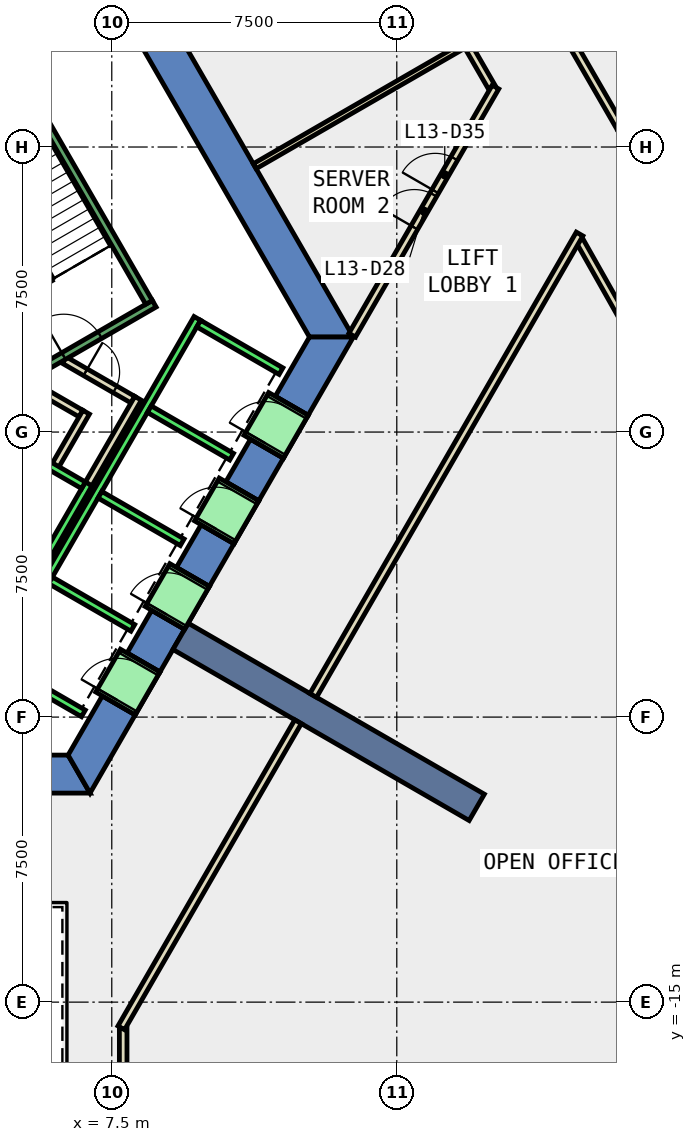
"""IFC4 building model, lengths in metres.
Left out: names, types, materials, properties, quantities, classifications, styles, units other than length and angle.
Written with IfcOpenShell. Run it as: python <this file> out.ifc"""

import sys

from ifc_helpers import new_model, si_unit, direction, frame, frame_2d, origin, place, context, subcontext, project, spatial, polyline, rectangle, outline, extrude, element, fill, save


model = new_model("IFC4")
c1 = context("Model", 3, precision=1e-05, world=origin(), true_north=direction((0.0, 1.0)))
c2 = subcontext(c1, "Body", "Model", "MODEL_VIEW")
j1 = project(units=[si_unit("LENGTHUNIT", "METRE"), si_unit("PLANEANGLEUNIT", "RADIAN")], contexts=[c1])
p1 = place(None, origin())
s1 = spatial("IfcSite", under=j1, at=p1, CompositionType="ELEMENT")
p2 = place(p1, origin())
s2 = spatial("IfcBuilding", under=s1, at=p2, CompositionType="ELEMENT")
p3 = place(p2, frame((0.0, 0.0, 64.4)))
s3 = spatial("IfcBuildingStorey", under=s2, at=p3, CompositionType="ELEMENT", Elevation=64.4)
p4 = place(p3, frame((0.0, 0.0, -0.4)))
e1 = element("IfcWall", 1, at=p4, inside=s3, PredefinedType="SHEAR", context=c2, shape_type="SweptSolid", body=[
    extrude(outline(polyline([(8.517, 11.748), (7.651, 11.248), (12.702, 2.5), (13.856, 2.5), (8.517, 11.748)])), origin(), (0.0, 0.0, 1.0), 4.2),
])
p5 = place(p3, frame((0.0, 0.0, -0.4)))
e2 = element("IfcWall", 2, at=p5, inside=s3, PredefinedType="SHEAR", context=c2, shape_type="SweptSolid", body=[
    extrude(outline(polyline([(5.75, -8.5), (5.75, -9.5), (6.928, -9.5), (6.351, -8.5), (5.75, -8.5)])), origin(), (0.0, 0.0, 1.0), 4.2),
])
p6 = place(p3, frame((0.0, 0.0, -0.4)))
e3 = element("IfcWall", 3, at=p6, inside=s3, PredefinedType="SHEAR", context=c2, shape_type="SweptSolid", body=[
    extrude(outline(polyline([(8.117, -7.44), (7.252, -6.94), (6.351, -8.5), (6.928, -9.5), (8.117, -7.44)])), origin(), (0.0, 0.0, 1.0), 4.2),
])
p7 = place(p3, frame((0.0, 0.0, -0.4)))
e4 = element("IfcWall", 4, at=p7, inside=s3, PredefinedType="SHEAR", context=c2, shape_type="SweptSolid", body=[
    extrude(outline(polyline([(9.417, -5.189), (8.551, -4.689), (7.902, -5.814), (8.767, -6.314), (9.417, -5.189)])), origin(), (0.0, 0.0, 1.0), 4.2),
])
p8 = place(p3, frame((0.0, 0.0, -0.4)))
e5 = element("IfcWall", 5, at=p8, inside=s3, PredefinedType="SHEAR", context=c2, shape_type="SweptSolid", body=[
    extrude(outline(polyline([(10.717, -2.937), (9.851, -2.437), (9.201, -3.563), (10.067, -4.063), (10.717, -2.937)])), origin(), (0.0, 0.0, 1.0), 4.2),
])
p9 = place(p3, frame((0.0, 0.0, -0.4)))
e6 = element("IfcWall", 6, at=p9, inside=s3, PredefinedType="SHEAR", context=c2, shape_type="SweptSolid", body=[
    extrude(outline(polyline([(12.017, -0.686), (11.151, -0.186), (10.501, -1.311), (11.367, -1.811), (12.017, -0.686)])), origin(), (0.0, 0.0, 1.0), 4.2),
])
p10 = place(p3, frame((0.0, 0.0, -0.4)))
e7 = element("IfcWall", 7, at=p10, inside=s3, PredefinedType="SHEAR", context=c2, shape_type="SweptSolid", body=[
    extrude(outline(polyline([(11.801, 0.94), (12.667, 0.44), (13.856, 2.5), (12.702, 2.5), (11.801, 0.94)])), origin(), (0.0, 0.0, 1.0), 4.2),
])
p11 = place(p3, frame((0.0, 0.0, 3.6)))
e8 = element("IfcWall", 8, at=p11, inside=s3, PredefinedType="SHEAR", context=c2, shape_type="SweptSolid", body=[
    extrude(outline(polyline([(8.767, -6.314), (7.902, -5.814), (7.252, -6.94), (8.117, -7.44), (8.767, -6.314)])), origin(), (0.0, 0.0, 1.0), 0.2),
])
p12 = place(p3, frame((0.0, 0.0, 3.6)))
e9 = element("IfcWall", 9, at=p12, inside=s3, PredefinedType="SHEAR", context=c2, shape_type="SweptSolid", body=[
    extrude(outline(polyline([(10.067, -4.063), (9.201, -3.563), (8.551, -4.689), (9.417, -5.189), (10.067, -4.063)])), origin(), (0.0, 0.0, 1.0), 0.2),
])
p13 = place(p3, frame((0.0, 0.0, 3.6)))
e10 = element("IfcWall", 10, at=p13, inside=s3, PredefinedType="SHEAR", context=c2, shape_type="SweptSolid", body=[
    extrude(outline(polyline([(11.367, -1.811), (10.501, -1.311), (9.851, -2.437), (10.717, -2.937), (11.367, -1.811)])), origin(), (0.0, 0.0, 1.0), 0.2),
])
p14 = place(p3, frame((0.0, 0.0, 3.6)))
e11 = element("IfcWall", 11, at=p14, inside=s3, PredefinedType="SHEAR", context=c2, shape_type="SweptSolid", body=[
    extrude(outline(polyline([(12.667, 0.44), (11.801, 0.94), (11.151, -0.186), (12.017, -0.686), (12.667, 0.44)])), origin(), (0.0, 0.0, 1.0), 0.2),
])
p15 = place(p3, frame((9.31, -5.375, -0.4), z_axis=(0.0, 0.0, 1.0), x_axis=(0.866017533419, -0.500013631625, 0.0)))
e12 = element("IfcWall", 12, at=p15, inside=s3, PredefinedType="SHEAR", context=c2, shape_type="SweptSolid", body=[
    extrude(rectangle(XDim=9.0, YDim=0.8, at=frame_2d((4.5, 0.0))), origin(), (0.0, 0.0, 1.0), 4.2),
])
p16 = place(p3, frame((17.497, 9.078, 0.0), z_axis=(0.0, 0.0, 1.0), x_axis=(-0.500126451326, 0.865952384768, 0.0)))
e13 = element("IfcWall", 13, at=p16, inside=s3, PredefinedType="PARTITIONING", context=c2, shape_type="SweptSolid", body=[
    extrude(rectangle(XDim=1.238, YDim=0.2, at=frame_2d((0.619, 0.0))), origin(), (0.0, 0.0, 1.0), 3.8),
])
p17 = place(p3, frame((22.42, 0.415, 0.0), z_axis=(0.0, 0.0, 1.0), x_axis=(-0.491823859571, 0.870694717543, 0.0)))
e14 = element("IfcWall", 14, at=p17, inside=s3, PredefinedType="PARTITIONING", context=c2, shape_type="SweptSolid", body=[
    extrude(rectangle(XDim=5.309, YDim=0.2, at=frame_2d((2.654, 0.0))), origin(), (0.0, 0.0, 1.0), 3.8),
])
p18 = place(p3, frame((17.318, 14.187, 0.0), z_axis=(0.0, 0.0, 1.0), x_axis=(0.499986381413, -0.866033266336, 0.0)))
e15 = element("IfcWall", 15, at=p18, inside=s3, PredefinedType="PARTITIONING", context=c2, shape_type="SweptSolid", body=[
    extrude(rectangle(XDim=7.18, YDim=0.2, at=frame_2d((3.59, 0.0))), origin(), (0.0, 0.0, 1.0), 3.8),
])
p19 = place(p18, frame((3.165, 0.0, 0.0)))
e16 = element("IfcOpeningElement", 16, at=p19, cuts=e15, PredefinedType="OPENING", context=c2, shape_type="SweptSolid", body=[
    extrude(rectangle(XDim=1.0, YDim=2.1, at=frame_2d((0.5, 1.05))), frame((0.0, 0.11, 0.0), z_axis=(0.0, -1.0, 0.0), x_axis=(1.0, 0.0, 0.0)), (0.0, 0.0, 1.0), 0.22),
])
p20 = place(p3, frame((5.499, 1.172, 0.0), z_axis=(0.0, 0.0, 1.0), x_axis=(0.866333505267, -0.499465972466, 0.0)))
e17 = element("IfcWall", 17, at=p20, inside=s3, PredefinedType="PARTITIONING", context=c2, shape_type="SweptSolid", body=[
    extrude(rectangle(XDim=1.374, YDim=0.2, at=frame_2d((0.687, 0.0))), origin(), (0.0, 0.0, 1.0), 3.8),
])
p21 = place(p3, frame((6.826, 0.522, 0.0), z_axis=(0.0, 0.0, 1.0), x_axis=(-0.500016722714, -0.866015748706, 0.0)))
e18 = element("IfcWall", 18, at=p21, inside=s3, PredefinedType="PARTITIONING", context=c2, shape_type="SweptSolid", body=[
    extrude(rectangle(XDim=1.7, YDim=0.2, at=frame_2d((0.85, 0.0))), origin(), (0.0, 0.0, 1.0), 3.8),
])
p22 = place(p3, frame((6.25, 1.894, 0.0), z_axis=(0.0, 0.0, 1.0), x_axis=(0.866043184279, -0.499969202016, 0.0)))
e19 = element("IfcWall", 19, at=p22, inside=s3, PredefinedType="PARTITIONING", context=c2, shape_type="SweptSolid", body=[
    extrude(rectangle(XDim=2.084, YDim=0.2, at=frame_2d((1.042, 0.0))), origin(), (0.0, 0.0, 1.0), 3.8),
])
p23 = place(p22, frame((0.642, 0.0, 0.0)))
e20 = element("IfcOpeningElement", 20, at=p23, cuts=e19, PredefinedType="OPENING", context=c2, shape_type="SweptSolid", body=[
    extrude(rectangle(XDim=0.9, YDim=2.1, at=frame_2d((0.45, 1.05))), frame((0.0, 0.11, 0.0), z_axis=(0.0, -1.0, 0.0), x_axis=(1.0, 0.0, 0.0)), (0.0, 0.0, 1.0), 0.22),
])
p24 = place(p3, frame((8.192, 0.888, 0.0), z_axis=(0.0, 0.0, 1.0), x_axis=(-0.499940625693, -0.866059680843, 0.0)))
e21 = element("IfcWall", 21, at=p24, inside=s3, PredefinedType="PARTITIONING", context=c2, shape_type="SweptSolid", body=[
    extrude(rectangle(XDim=2.68, YDim=0.2, at=frame_2d((1.34, 0.0))), origin(), (0.0, 0.0, 1.0), 3.8),
])
p25 = place(p3, frame((11.261, 6.994, 0.0), z_axis=(0.0, 0.0, 1.0), x_axis=(0.866043905515, 0.499967952693, 0.0)))
e22 = element("IfcWall", 22, at=p25, inside=s3, PredefinedType="PARTITIONING", context=c2, shape_type="SweptSolid", body=[
    extrude(rectangle(XDim=6.542, YDim=0.15, at=frame_2d((3.271, 0.0))), origin(), (0.0, 0.0, 1.0), 3.8),
])
p26 = place(p3, frame((13.827, 2.55, 0.0), z_axis=(0.0, 0.0, 1.0), x_axis=(0.500116794417, 0.865957961995, 0.0)))
e23 = element("IfcWall", 23, at=p26, inside=s3, PredefinedType="PARTITIONING", context=c2, shape_type="SweptSolid", body=[
    extrude(rectangle(XDim=7.538, YDim=0.2, at=frame_2d((3.769, 0.0))), origin(), (0.0, 0.0, 1.0), 3.8),
])
p27 = place(p26, frame((3.269, 0.0, 0.0)))
e24 = element("IfcOpeningElement", 24, at=p27, cuts=e23, PredefinedType="OPENING", context=c2, shape_type="SweptSolid", body=[
    extrude(rectangle(XDim=1.0, YDim=2.1, at=frame_2d((0.5, 1.05))), frame((0.0, 0.11, 0.0), z_axis=(0.0, -1.0, 0.0), x_axis=(1.0, 0.0, 0.0)), (0.0, 0.0, 1.0), 0.22),
])
p28 = place(p26, frame((4.369, 0.0, 0.0)))
e25 = element("IfcOpeningElement", 25, at=p28, cuts=e23, PredefinedType="OPENING", context=c2, shape_type="SweptSolid", body=[
    extrude(rectangle(XDim=1.0, YDim=2.1, at=frame_2d((0.5, 1.05))), frame((0.0, 0.11, 0.0), z_axis=(0.0, -1.0, 0.0), x_axis=(1.0, 0.0, 0.0)), (0.0, 0.0, 1.0), 0.22),
])
p29 = place(p3, frame((7.8, -15.69, 0.0), z_axis=(0.0, 0.0, 1.0), x_axis=(0.0, -1.0, 0.0)))
e26 = element("IfcWall", 26, at=p29, inside=s3, PredefinedType="PARTITIONING", context=c2, shape_type="SweptSolid", body=[
    extrude(rectangle(XDim=3.87, YDim=0.2, at=frame_2d((1.935, 0.0))), origin(), (0.0, 0.0, 1.0), 3.8),
])
p30 = place(p3, frame((19.81, 5.211, 0.0), z_axis=(0.0, 0.0, 1.0), x_axis=(-0.500003368273, -0.866023459102, 0.0)))
e27 = element("IfcWall", 27, at=p30, inside=s3, PredefinedType="PARTITIONING", context=c2, shape_type="SweptSolid", body=[
    extrude(rectangle(XDim=14.018, YDim=0.2, at=frame_2d((7.009, 0.0))), origin(), (0.0, 0.0, 1.0), 3.8),
])
p31 = place(p3, frame((12.401, -7.622, 0.0), z_axis=(0.0, 0.0, 1.0), x_axis=(-0.500029185841, -0.866008552675, 0.0)))
e28 = element("IfcWall", 28, at=p31, inside=s3, PredefinedType="PARTITIONING", context=c2, shape_type="SweptSolid", body=[
    extrude(rectangle(XDim=9.301, YDim=0.2, at=frame_2d((4.651, 0.0))), origin(), (0.0, 0.0, 1.0), 3.8),
])
p32 = place(p3, frame((5.492, -3.788, 0.0), z_axis=(0.0, 0.0, 1.0), x_axis=(0.500011755427, 0.866018616679, 0.0)))
e29 = element("IfcWall", 29, at=p32, inside=s3, PredefinedType="STANDARD", context=c2, shape_type="SweptSolid", body=[
    extrude(rectangle(XDim=2.8, YDim=0.2, at=frame_2d((1.4, 0.0))), origin(), (0.0, 0.0, 1.0), 3.8),
])
p33 = place(p3, frame((4.677, -0.2, 0.0), z_axis=(0.0, 0.0, 1.0), x_axis=(0.865973769406, -0.500089422704, 0.0)))
e30 = element("IfcWall", 30, at=p33, inside=s3, PredefinedType="STANDARD", context=c2, shape_type="SweptSolid", body=[
    extrude(rectangle(XDim=2.399, YDim=0.2, at=frame_2d((1.2, 0.0))), origin(), (0.0, 0.0, 1.0), 3.8),
])
p34 = place(p3, frame((4.451, -6.19, 0.0), z_axis=(0.0, 0.0, 1.0), x_axis=(0.50000090737, 0.866024879913, 0.0)))
e31 = element("IfcWall", 31, at=p34, inside=s3, PredefinedType="STANDARD", context=c2, shape_type="SweptSolid", body=[
    extrude(rectangle(XDim=10.6, YDim=0.2, at=frame_2d((5.3, 0.0))), origin(), (0.0, 0.0, 1.0), 3.8),
])
for number, where, z_axis, x_axis in (
    (32, (4.588, -6.153, 0.0), (0.0, 0.0, 1.0), (0.866, -0.5, 0.0)),
    (33, (5.888, -3.902, 0.0), (0.0, 0.0, 1.0), (0.866, -0.5, 0.0)),
    (34, (7.188, -1.65, 0.0), (0.0, 0.0, 1.0), (0.866, -0.5, 0.0)),
    (35, (8.488, 0.602, 0.0), (0.0, 0.0, 1.0), (0.866, -0.5, 0.0)),
):
    element("IfcWall", number, at=place(p3, frame(where, z_axis=z_axis, x_axis=x_axis)), inside=s3, PredefinedType="STANDARD", context=c2, shape_type="SweptSolid", body=[
        extrude(rectangle(XDim=2.5, YDim=0.2, at=frame_2d((1.25, 0.0))), origin(), (0.0, 0.0, 1.0), 3.8),
    ])
p35 = place(p3, frame((9.788, 2.853, 0.0), z_axis=(0.0, 0.0, 1.0), x_axis=(0.865998541277, -0.500046524342, 0.0)))
e36 = element("IfcWall", 36, at=p35, inside=s3, PredefinedType="STANDARD", context=c2, shape_type="SweptSolid", body=[
    extrude(rectangle(XDim=2.5, YDim=0.2, at=frame_2d((1.25, 0.0))), origin(), (0.0, 0.0, 1.0), 3.8),
])
p36 = place(p3, frame((7.598, -7.14, 0.0), z_axis=(0.0, 0.0, 1.0), x_axis=(0.500362116554, 0.865816234728, 0.0)))
e37 = element("IfcWall", 37, at=p36, inside=s3, PredefinedType="STANDARD", context=c2, shape_type="SweptSolid", body=[
    extrude(rectangle(XDim=1.299, YDim=1.2, at=frame_2d((0.65, 0.0))), origin(), (0.0, 0.0, 1.0), 2.4),
])
p37 = place(p36, frame((0.1, 0.0, 0.0)))
e38 = element("IfcOpeningElement", 38, at=p37, cuts=e37, PredefinedType="OPENING", context=c2, shape_type="SweptSolid", body=[
    extrude(rectangle(XDim=1.1, YDim=2.3, at=frame_2d((0.55, 1.15))), frame((0.0, 0.61, 0.0), z_axis=(0.0, -1.0, 0.0), x_axis=(1.0, 0.0, 0.0)), (0.0, 0.0, 1.0), 1.22),
])
p38 = place(p3, frame((8.898, -4.889, 0.0), z_axis=(0.0, 0.0, 1.0), x_axis=(0.500036693733, 0.866004217611, 0.0)))
e39 = element("IfcWall", 39, at=p38, inside=s3, PredefinedType="STANDARD", context=c2, shape_type="SweptSolid", body=[
    extrude(rectangle(XDim=1.3, YDim=1.2, at=frame_2d((0.65, 0.0))), origin(), (0.0, 0.0, 1.0), 2.4),
])
p39 = place(p38, frame((0.1, 0.0, 0.0)))
e40 = element("IfcOpeningElement", 40, at=p39, cuts=e39, PredefinedType="OPENING", context=c2, shape_type="SweptSolid", body=[
    extrude(rectangle(XDim=1.1, YDim=2.3, at=frame_2d((0.55, 1.15))), frame((0.0, 0.61, 0.0), z_axis=(0.0, -1.0, 0.0), x_axis=(1.0, 0.0, 0.0)), (0.0, 0.0, 1.0), 1.22),
])
p40 = place(p3, frame((10.198, -2.637, 0.0), z_axis=(0.0, 0.0, 1.0), x_axis=(0.49989585183, 0.866085525409, 0.0)))
e41 = element("IfcWall", 41, at=p40, inside=s3, PredefinedType="STANDARD", context=c2, shape_type="SweptSolid", body=[
    extrude(rectangle(XDim=1.3, YDim=1.2, at=frame_2d((0.65, 0.0))), origin(), (0.0, 0.0, 1.0), 2.4),
])
p41 = place(p40, frame((0.1, 0.0, 0.0)))
e42 = element("IfcOpeningElement", 42, at=p41, cuts=e41, PredefinedType="OPENING", context=c2, shape_type="SweptSolid", body=[
    extrude(rectangle(XDim=1.1, YDim=2.3, at=frame_2d((0.55, 1.15))), frame((0.0, 0.61, 0.0), z_axis=(0.0, -1.0, 0.0), x_axis=(1.0, 0.0, 0.0)), (0.0, 0.0, 1.0), 1.22),
])
p42 = place(p3, frame((11.498, -0.385, 0.0), z_axis=(0.0, 0.0, 1.0), x_axis=(0.500221244143, 0.865897630733, 0.0)))
e43 = element("IfcWall", 43, at=p42, inside=s3, PredefinedType="STANDARD", context=c2, shape_type="SweptSolid", body=[
    extrude(rectangle(XDim=1.299, YDim=1.2, at=frame_2d((0.65, 0.0))), origin(), (0.0, 0.0, 1.0), 2.4),
])
p43 = place(p42, frame((0.1, 0.0, 0.0)))
e44 = element("IfcOpeningElement", 44, at=p43, cuts=e43, PredefinedType="OPENING", context=c2, shape_type="SweptSolid", body=[
    extrude(rectangle(XDim=1.1, YDim=2.3, at=frame_2d((0.55, 1.15))), frame((0.0, 0.61, 0.0), z_axis=(0.0, -1.0, 0.0), x_axis=(1.0, 0.0, 0.0)), (0.0, 0.0, 1.0), 1.22),
])
p44 = place(p3, frame((4.806, 1.176, 0.0), z_axis=(0.0, 0.0, 1.0), x_axis=(0.866059941101, 0.499940174841, 0.0)))
e45 = element("IfcWall", 45, at=p44, inside=s3, PredefinedType="STANDARD", context=c2, shape_type="SweptSolid", body=[
    extrude(rectangle(XDim=4.4, YDim=0.2, at=frame_2d((2.2, 0.0))), origin(), (0.0, 0.0, 1.0), 3.8),
])
p45 = place(p44, frame((1.65, 0.0, 0.0)))
e46 = element("IfcOpeningElement", 46, at=p45, cuts=e45, PredefinedType="OPENING", context=c2, shape_type="SweptSolid", body=[
    extrude(rectangle(XDim=1.1, YDim=2.2, at=frame_2d((0.55, 1.1))), frame((0.0, 0.11, 0.0), z_axis=(0.0, -1.0, 0.0), x_axis=(1.0, 0.0, 0.0)), (0.0, 0.0, 1.0), 0.22),
])
p46 = place(p3, frame((8.48, 3.412, 0.0), z_axis=(0.0, 0.0, 1.0), x_axis=(-0.499978703459, 0.866037698999, 0.0)))
e47 = element("IfcWall", 47, at=p46, inside=s3, PredefinedType="STANDARD", context=c2, shape_type="SweptSolid", body=[
    extrude(rectangle(XDim=6.9, YDim=0.2, at=frame_2d((3.45, 0.0))), origin(), (0.0, 0.0, 1.0), 3.8),
])
p47 = place(p27, origin())
e48 = element("IfcDoor", 48, at=p47, inside=s3, OperationType="SINGLE_SWING_LEFT", PredefinedType="DOOR", context=c2, shape_type="SweptSolid", body=[
    extrude(rectangle(XDim=1.0, YDim=2.1, at=frame_2d((0.5, 1.05))), frame((0.0, 0.025, 0.0), z_axis=(0.0, -1.0, 0.0), x_axis=(1.0, 0.0, 0.0)), (0.0, 0.0, 1.0), 0.05),
])
fill(e24, e48)
p48 = place(p23, origin())
e49 = element("IfcDoor", 49, at=p48, inside=s3, OperationType="SINGLE_SWING_LEFT", PredefinedType="DOOR", context=c2, shape_type="SweptSolid", body=[
    extrude(rectangle(XDim=0.9, YDim=2.1, at=frame_2d((0.45, 1.05))), frame((0.0, 0.025, 0.0), z_axis=(0.0, -1.0, 0.0), x_axis=(1.0, 0.0, 0.0)), (0.0, 0.0, 1.0), 0.05),
])
fill(e20, e49)
p49 = place(p28, origin())
e50 = element("IfcDoor", 50, at=p49, inside=s3, OperationType="SINGLE_SWING_RIGHT", PredefinedType="DOOR", context=c2, shape_type="SweptSolid", body=[
    extrude(rectangle(XDim=1.0, YDim=2.1, at=frame_2d((0.5, 1.05))), frame((0.0, 0.025, 0.0), z_axis=(0.0, -1.0, 0.0), x_axis=(1.0, 0.0, 0.0)), (0.0, 0.0, 1.0), 0.05),
])
fill(e25, e50)
p50 = place(p37, origin())
e51 = element("IfcDoor", 51, at=p50, inside=s3, OperationType="SLIDING_TO_LEFT", PredefinedType="DOOR", context=c2, shape_type="SweptSolid", body=[
    extrude(rectangle(XDim=1.1, YDim=2.3, at=frame_2d((0.55, 1.15))), frame((0.0, 0.025, 0.0), z_axis=(0.0, -1.0, 0.0), x_axis=(1.0, 0.0, 0.0)), (0.0, 0.0, 1.0), 0.05),
])
fill(e38, e51)
p51 = place(p39, origin())
e52 = element("IfcDoor", 52, at=p51, inside=s3, OperationType="SLIDING_TO_LEFT", PredefinedType="DOOR", context=c2, shape_type="SweptSolid", body=[
    extrude(rectangle(XDim=1.1, YDim=2.3, at=frame_2d((0.55, 1.15))), frame((0.0, 0.025, 0.0), z_axis=(0.0, -1.0, 0.0), x_axis=(1.0, 0.0, 0.0)), (0.0, 0.0, 1.0), 0.05),
])
fill(e40, e52)
p52 = place(p41, origin())
e53 = element("IfcDoor", 53, at=p52, inside=s3, OperationType="SLIDING_TO_LEFT", PredefinedType="DOOR", context=c2, shape_type="SweptSolid", body=[
    extrude(rectangle(XDim=1.1, YDim=2.3, at=frame_2d((0.55, 1.15))), frame((0.0, 0.025, 0.0), z_axis=(0.0, -1.0, 0.0), x_axis=(1.0, 0.0, 0.0)), (0.0, 0.0, 1.0), 0.05),
])
fill(e42, e53)
p53 = place(p43, origin())
e54 = element("IfcDoor", 54, at=p53, inside=s3, OperationType="SLIDING_TO_LEFT", PredefinedType="DOOR", context=c2, shape_type="SweptSolid", body=[
    extrude(rectangle(XDim=1.1, YDim=2.3, at=frame_2d((0.55, 1.15))), frame((0.0, 0.025, 0.0), z_axis=(0.0, -1.0, 0.0), x_axis=(1.0, 0.0, 0.0)), (0.0, 0.0, 1.0), 0.05),
])
fill(e44, e54)
p54 = place(p45, origin())
e55 = element("IfcDoor", 55, at=p54, inside=s3, OperationType="SINGLE_SWING_LEFT", PredefinedType="DOOR", context=c2, shape_type="SweptSolid", body=[
    extrude(rectangle(XDim=1.1, YDim=2.2, at=frame_2d((0.55, 1.1))), frame((0.0, 0.025, 0.0), z_axis=(0.0, -1.0, 0.0), x_axis=(1.0, 0.0, 0.0)), (0.0, 0.0, 1.0), 0.05),
])
fill(e46, e55)
save(model, sys.argv[1])
